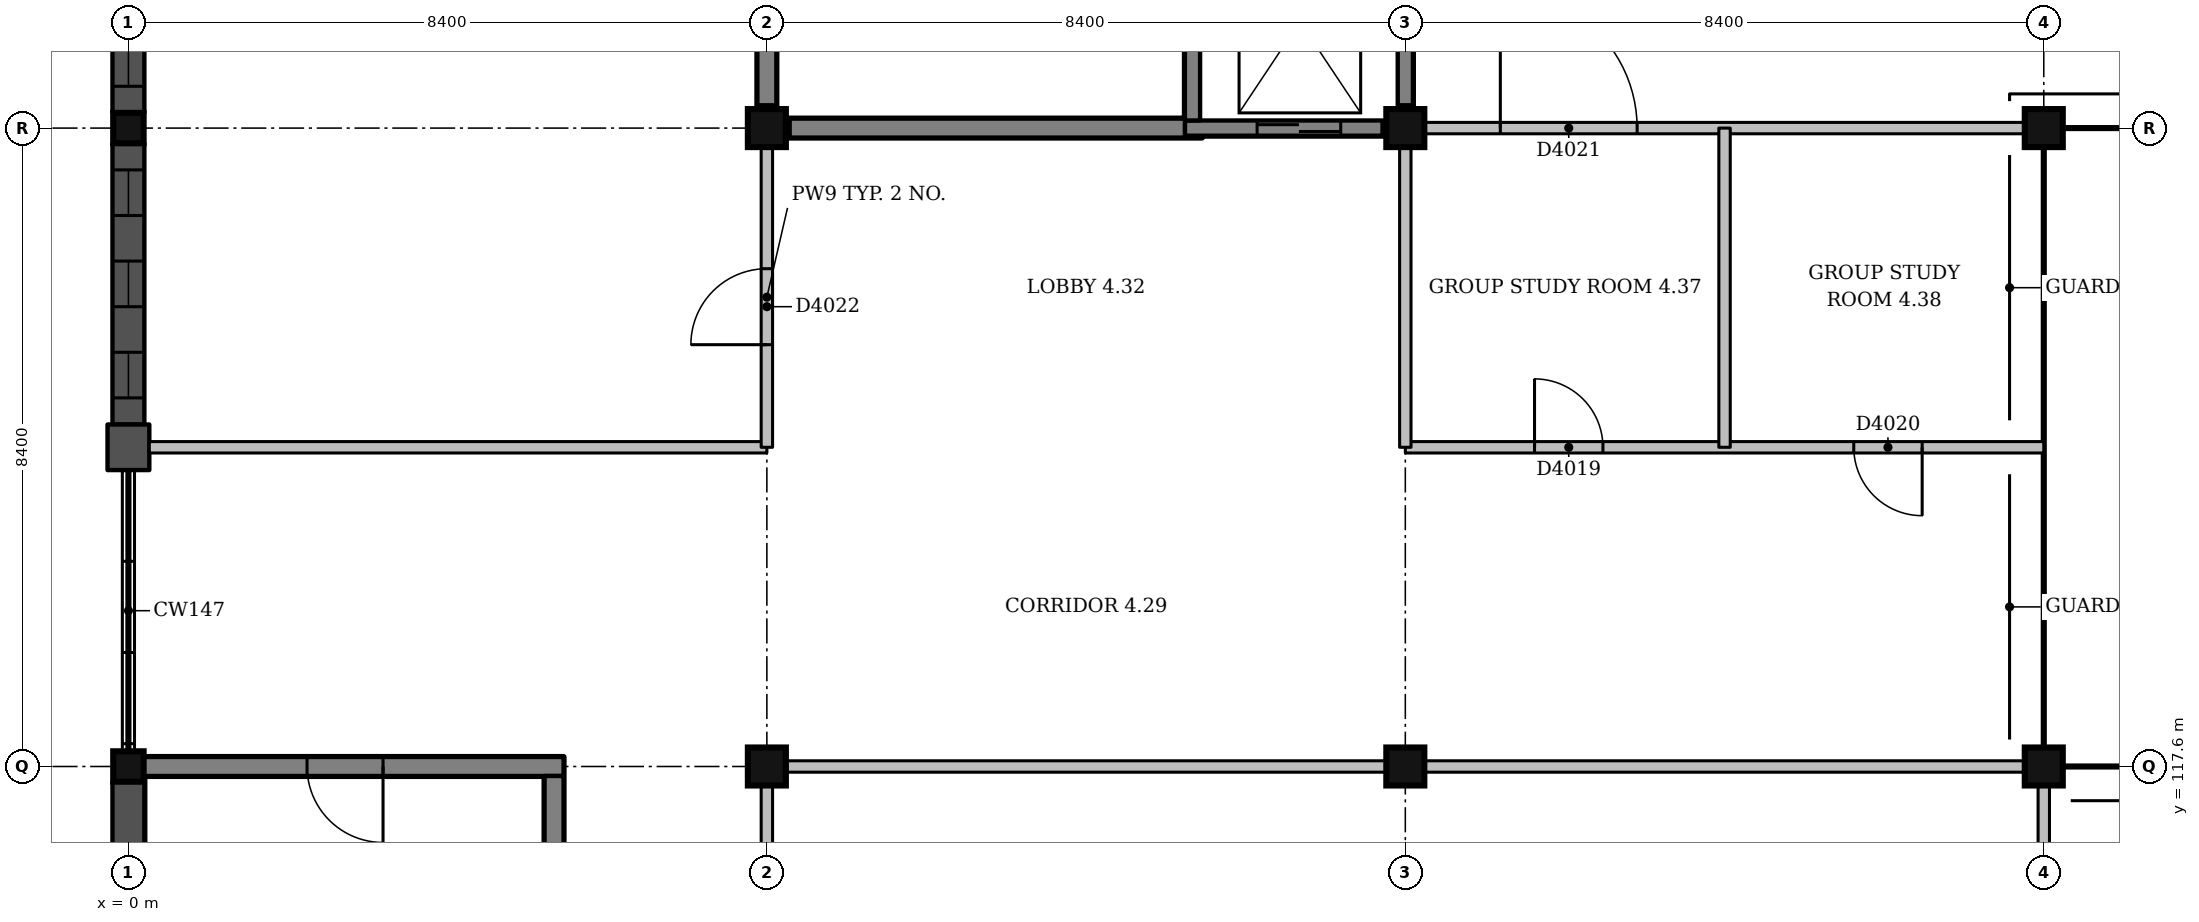
"""IFC4 building model, lengths in metres.
Left out: names, types, materials, properties, quantities, classifications, styles, units other than length and angle.
Written with IfcOpenShell. Run it as: python <this file> out.ifc"""

import sys

from ifc_helpers import new_model, si_unit, direction, frame, frame_2d, origin, origin_2d, place, context, subcontext, project, spatial, rectangle, extrude, element, fill, save


model = new_model("IFC4")
c1 = context("Model", 3, precision=1e-05, world=origin(), true_north=direction((0.0, 1.0)))
c2 = subcontext(c1, "Body", "Model", "MODEL_VIEW")
j1 = project(units=[si_unit("LENGTHUNIT", "METRE"), si_unit("PLANEANGLEUNIT", "RADIAN")], contexts=[c1])
p1 = place(None, origin())
s1 = spatial("IfcSite", under=j1, at=p1, CompositionType="ELEMENT")
p2 = place(p1, origin())
s2 = spatial("IfcBuilding", under=s1, at=p2, CompositionType="ELEMENT")
p3 = place(p2, frame((0.0, 0.0, 18.0)))
s3 = spatial("IfcBuildingStorey", under=s2, at=p3, CompositionType="ELEMENT", Elevation=18.0)
for number, where, z_axis, x_axis in (
    (1, (0.0, 117.6, 0.0), (0.0, 0.0, 1.0), (1.0, 0.0, 0.0)),
    (2, (0.0, 126.0, 0.0), (0.0, 0.0, 1.0), (1.0, 0.0, 0.0)),
):
    element("IfcColumn", number, at=place(p3, frame(where, z_axis=z_axis, x_axis=x_axis)), inside=s3, PredefinedType="COLUMN", context=c2, shape_type="SweptSolid", body=[
        extrude(rectangle(XDim=0.4, YDim=0.4, at=origin_2d()), origin(), (0.0, 0.0, 1.0), 4.5),
    ])
for number, where, z_axis, x_axis in (
    (3, (8.4, 117.6, 0.0), (0.0, 0.0, 1.0), (1.0, 0.0, 0.0)),
    (4, (8.4, 126.0, 0.0), (0.0, 0.0, 1.0), (1.0, 0.0, 0.0)),
    (5, (16.8, 117.6, 0.0), (0.0, 0.0, 1.0), (1.0, 0.0, 0.0)),
    (6, (16.8, 126.0, 0.0), (0.0, 0.0, 1.0), (1.0, 0.0, 0.0)),
    (7, (25.2, 117.6, 0.0), (0.0, 0.0, 1.0), (1.0, 0.0, 0.0)),
    (8, (25.2, 126.0, 0.0), (0.0, 0.0, 1.0), (1.0, 0.0, 0.0)),
):
    element("IfcColumn", number, at=place(p3, frame(where, z_axis=z_axis, x_axis=x_axis)), inside=s3, PredefinedType="COLUMN", context=c2, shape_type="SweptSolid", body=[
        extrude(rectangle(XDim=0.5, YDim=0.5, at=origin_2d()), origin(), (0.0, 0.0, 1.0), 4.5),
    ])
p4 = place(p3, frame((13.9, 126.0, 0.0), z_axis=(0.0, 0.0, 1.0), x_axis=(1.0, 0.0, 0.0)))
e9 = element("IfcWall", 9, at=p4, inside=s3, PredefinedType="SHEAR", context=c2, shape_type="SweptSolid", body=[
    extrude(rectangle(XDim=2.6, YDim=0.2, at=frame_2d((1.3, 0.0))), origin(), (0.0, 0.0, 1.0), 4.5),
])
p5 = place(p4, frame((0.95, 0.0, 0.0)))
e10 = element("IfcOpeningElement", 10, at=p5, cuts=e9, PredefinedType="OPENING", context=c2, shape_type="SweptSolid", body=[
    extrude(rectangle(XDim=1.1, YDim=2.1, at=frame_2d((0.55, 1.05))), frame((0.0, 0.11, 0.0), z_axis=(0.0, -1.0, 0.0), x_axis=(1.0, 0.0, 0.0)), (0.0, 0.0, 1.0), 0.22),
])
p6 = place(p3, frame((14.0, 126.1, 0.0), z_axis=(0.0, 0.0, 1.0), x_axis=(0.0, 1.0, 0.0)))
e11 = element("IfcWall", 11, at=p6, inside=s3, PredefinedType="SHEAR", context=c2, shape_type="SweptSolid", body=[
    extrude(rectangle(XDim=4.0, YDim=0.2, at=frame_2d((2.0, 0.0))), origin(), (0.0, 0.0, 1.0), 4.5),
])
p7 = place(p3, frame((16.8, 126.3, 0.0), z_axis=(0.0, 0.0, 1.0), x_axis=(0.0, 1.0, 0.0)))
e12 = element("IfcWall", 12, at=p7, inside=s3, PredefinedType="SHEAR", context=c2, shape_type="SweptSolid", body=[
    extrude(rectangle(XDim=3.8, YDim=0.2, at=frame_2d((1.9, 0.0))), origin(), (0.0, 0.0, 1.0), 4.5),
])
p8 = place(p3, frame((0.2, 117.6, 0.0), z_axis=(0.0, 0.0, 1.0), x_axis=(1.0, 0.0, 0.0)))
e13 = element("IfcWall", 13, at=p8, inside=s3, PredefinedType="SHEAR", context=c2, shape_type="SweptSolid", body=[
    extrude(rectangle(XDim=5.525, YDim=0.25, at=frame_2d((2.763, 0.0))), origin(), (0.0, 0.0, 1.0), 4.5),
])
p9 = place(p8, frame((2.15, 0.0, 0.0)))
e14 = element("IfcOpeningElement", 14, at=p9, cuts=e13, PredefinedType="OPENING", context=c2, shape_type="SweptSolid", body=[
    extrude(rectangle(XDim=1.0, YDim=2.1, at=frame_2d((0.5, 1.05))), frame((0.0, 0.135, 0.0), z_axis=(0.0, -1.0, 0.0), x_axis=(1.0, 0.0, 0.0)), (0.0, 0.0, 1.0), 0.27),
])
p10 = place(p3, frame((5.6, 113.41, 0.0), z_axis=(0.0, 0.0, 1.0), x_axis=(0.0, 1.0, 0.0)))
e15 = element("IfcWall", 15, at=p10, inside=s3, PredefinedType="SHEAR", context=c2, shape_type="SweptSolid", body=[
    extrude(rectangle(XDim=4.065, YDim=0.25, at=frame_2d((2.033, 0.0))), origin(), (0.0, 0.0, 1.0), 4.5),
])
p11 = place(p3, frame((8.7, 126.0, 0.0), z_axis=(0.0, 0.0, 1.0), x_axis=(1.0, 0.0, 0.0)))
e16 = element("IfcWall", 16, at=p11, inside=s3, PredefinedType="SHEAR", context=c2, shape_type="SweptSolid", body=[
    extrude(rectangle(XDim=5.2, YDim=0.25, at=frame_2d((2.6, 0.0))), origin(), (0.0, 0.0, 1.0), 4.5),
])
p12 = place(p3, frame((8.4, 126.3, 0.0), z_axis=(0.0, 0.0, 1.0), x_axis=(0.0, 1.0, 0.0)))
e17 = element("IfcWall", 17, at=p12, inside=s3, PredefinedType="SHEAR", context=c2, shape_type="SweptSolid", body=[
    extrude(rectangle(XDim=7.9, YDim=0.25, at=frame_2d((3.95, 0.0))), origin(), (0.0, 0.0, 1.0), 4.5),
])
p13 = place(p12, frame((6.35, 0.0, 0.0)))
e18 = element("IfcOpeningElement", 18, at=p13, cuts=e17, PredefinedType="OPENING", context=c2, shape_type="SweptSolid", body=[
    extrude(rectangle(XDim=1.0, YDim=2.1, at=frame_2d((0.5, 1.05))), frame((0.0, 0.135, 0.0), z_axis=(0.0, -1.0, 0.0), x_axis=(1.0, 0.0, 0.0)), (0.0, 0.0, 1.0), 0.27),
])
p14 = place(p3, frame((0.0, 129.9, 0.0), z_axis=(0.0, 0.0, 1.0), x_axis=(0.0, -1.0, 0.0)))
e19 = element("IfcWall", 19, at=p14, inside=s3, PredefinedType="SOLIDWALL", context=c2, shape_type="SweptSolid", body=[
    extrude(rectangle(XDim=3.7, YDim=0.42, at=frame_2d((1.85, 0.0))), origin(), (0.0, 0.0, 1.0), 3.35),
])
p15 = place(p14, frame((0.35, 0.0, 1.0)))
e20 = element("IfcOpeningElement", 20, at=p15, cuts=e19, PredefinedType="OPENING", context=c2, shape_type="SweptSolid", body=[
    extrude(rectangle(XDim=0.6, YDim=1.8, at=frame_2d((0.3, 0.9))), frame((0.0, 0.22, 0.0), z_axis=(0.0, -1.0, 0.0), x_axis=(1.0, 0.0, 0.0)), (0.0, 0.0, 1.0), 0.44),
])
p16 = place(p14, frame((1.55, 0.0, 1.0)))
e21 = element("IfcOpeningElement", 21, at=p16, cuts=e19, PredefinedType="OPENING", context=c2, shape_type="SweptSolid", body=[
    extrude(rectangle(XDim=0.6, YDim=1.8, at=frame_2d((0.3, 0.9))), frame((0.0, 0.22, 0.0), z_axis=(0.0, -1.0, 0.0), x_axis=(1.0, 0.0, 0.0)), (0.0, 0.0, 1.0), 0.44),
])
p17 = place(p14, frame((2.75, 0.0, 1.0)))
e22 = element("IfcOpeningElement", 22, at=p17, cuts=e19, PredefinedType="OPENING", context=c2, shape_type="SweptSolid", body=[
    extrude(rectangle(XDim=0.6, YDim=1.8, at=frame_2d((0.3, 0.9))), frame((0.0, 0.22, 0.0), z_axis=(0.0, -1.0, 0.0), x_axis=(1.0, 0.0, 0.0)), (0.0, 0.0, 1.0), 0.44),
])
p18 = place(p3, frame((0.0, 125.8, 0.0), z_axis=(0.0, 0.0, 1.0), x_axis=(0.0, -1.0, 0.0)))
e23 = element("IfcWall", 23, at=p18, inside=s3, PredefinedType="SOLIDWALL", context=c2, shape_type="SweptSolid", body=[
    extrude(rectangle(XDim=3.7, YDim=0.42, at=frame_2d((1.85, 0.0))), origin(), (0.0, 0.0, 1.0), 3.35),
])
p19 = place(p18, frame((0.35, 0.0, 1.0)))
e24 = element("IfcOpeningElement", 24, at=p19, cuts=e23, PredefinedType="OPENING", context=c2, shape_type="SweptSolid", body=[
    extrude(rectangle(XDim=0.6, YDim=1.8, at=frame_2d((0.3, 0.9))), frame((0.0, 0.22, 0.0), z_axis=(0.0, -1.0, 0.0), x_axis=(1.0, 0.0, 0.0)), (0.0, 0.0, 1.0), 0.44),
])
p20 = place(p18, frame((1.55, 0.0, 1.0)))
e25 = element("IfcOpeningElement", 25, at=p20, cuts=e23, PredefinedType="OPENING", context=c2, shape_type="SweptSolid", body=[
    extrude(rectangle(XDim=0.6, YDim=1.8, at=frame_2d((0.3, 0.9))), frame((0.0, 0.22, 0.0), z_axis=(0.0, -1.0, 0.0), x_axis=(1.0, 0.0, 0.0)), (0.0, 0.0, 1.0), 0.44),
])
p21 = place(p18, frame((2.75, 0.0, 1.0)))
e26 = element("IfcOpeningElement", 26, at=p21, cuts=e23, PredefinedType="OPENING", context=c2, shape_type="SweptSolid", body=[
    extrude(rectangle(XDim=0.6, YDim=1.8, at=frame_2d((0.3, 0.9))), frame((0.0, 0.22, 0.0), z_axis=(0.0, -1.0, 0.0), x_axis=(1.0, 0.0, 0.0)), (0.0, 0.0, 1.0), 0.44),
])
p22 = place(p3, frame((0.0, 122.1, 0.0), z_axis=(0.0, 0.0, 1.0), x_axis=(0.0, -1.0, 0.0)))
e27 = element("IfcWall", 27, at=p22, inside=s3, PredefinedType="SOLIDWALL", context=c2, shape_type="SweptSolid", body=[
    extrude(rectangle(XDim=0.6, YDim=0.55, at=frame_2d((0.3, 0.0))), origin(), (0.0, 0.0, 1.0), 3.35),
])
p23 = place(p3, frame((0.0, 117.4, 0.0), z_axis=(0.0, 0.0, 1.0), x_axis=(0.0, -1.0, 0.0)))
e28 = element("IfcWall", 28, at=p23, inside=s3, PredefinedType="SOLIDWALL", context=c2, shape_type="SweptSolid", body=[
    extrude(rectangle(XDim=3.7, YDim=0.42, at=frame_2d((1.85, 0.0))), origin(), (0.0, 0.0, 1.0), 4.5),
])
p24 = place(p3, frame((8.65, 117.6, 0.0), z_axis=(0.0, 0.0, 1.0), x_axis=(1.0, 0.0, 0.0)))
e29 = element("IfcWall", 29, at=p24, inside=s3, PredefinedType="PARTITIONING", context=c2, shape_type="SweptSolid", body=[
    extrude(rectangle(XDim=7.9, YDim=0.15, at=frame_2d((3.95, 0.0))), origin(), (0.0, 0.0, 1.0), 3.4),
])
p25 = place(p3, frame((17.05, 117.6, 0.0), z_axis=(0.0, 0.0, 1.0), x_axis=(1.0, 0.0, 0.0)))
e30 = element("IfcWall", 30, at=p25, inside=s3, PredefinedType="PARTITIONING", context=c2, shape_type="SweptSolid", body=[
    extrude(rectangle(XDim=7.9, YDim=0.15, at=frame_2d((3.95, 0.0))), origin(), (0.0, 0.0, 1.0), 3.4),
])
p26 = place(p3, frame((0.275, 121.8, 0.0), z_axis=(0.0, 0.0, 1.0), x_axis=(1.0, 0.0, 0.0)))
e31 = element("IfcWall", 31, at=p26, inside=s3, PredefinedType="PARTITIONING", context=c2, shape_type="SweptSolid", body=[
    extrude(rectangle(XDim=8.125, YDim=0.15, at=frame_2d((4.062, 0.0))), origin(), (0.0, 0.0, 1.0), 3.4),
])
p27 = place(p3, frame((16.8, 121.8, 0.0), z_axis=(0.0, 0.0, 1.0), x_axis=(1.0, 0.0, 0.0)))
e32 = element("IfcWall", 32, at=p27, inside=s3, PredefinedType="PARTITIONING", context=c2, shape_type="SweptSolid", body=[
    extrude(rectangle(XDim=8.4, YDim=0.15, at=frame_2d((4.2, 0.0))), origin(), (0.0, 0.0, 1.0), 3.4),
])
p28 = place(p27, frame((1.7, 0.0, 0.0)))
e33 = element("IfcOpeningElement", 33, at=p28, cuts=e32, PredefinedType="OPENING", context=c2, shape_type="SweptSolid", body=[
    extrude(rectangle(XDim=0.9, YDim=2.1, at=frame_2d((0.45, 1.05))), frame((0.0, 0.085, 0.0), z_axis=(0.0, -1.0, 0.0), x_axis=(1.0, 0.0, 0.0)), (0.0, 0.0, 1.0), 0.17),
])
p29 = place(p27, frame((5.9, 0.0, 0.0)))
e34 = element("IfcOpeningElement", 34, at=p29, cuts=e32, PredefinedType="OPENING", context=c2, shape_type="SweptSolid", body=[
    extrude(rectangle(XDim=0.9, YDim=2.1, at=frame_2d((0.45, 1.05))), frame((0.0, 0.085, 0.0), z_axis=(0.0, -1.0, 0.0), x_axis=(1.0, 0.0, 0.0)), (0.0, 0.0, 1.0), 0.17),
])
p30 = place(p3, frame((17.05, 126.0, 0.0), z_axis=(0.0, 0.0, 1.0), x_axis=(1.0, 0.0, 0.0)))
e35 = element("IfcWall", 35, at=p30, inside=s3, PredefinedType="PARTITIONING", context=c2, shape_type="SweptSolid", body=[
    extrude(rectangle(XDim=7.9, YDim=0.15, at=frame_2d((3.95, 0.0))), origin(), (0.0, 0.0, 1.0), 3.4),
])
p31 = place(p30, frame((1.0, 0.0, 0.0)))
e36 = element("IfcOpeningElement", 36, at=p31, cuts=e35, PredefinedType="OPENING", context=c2, shape_type="SweptSolid", body=[
    extrude(rectangle(XDim=1.8, YDim=2.1, at=frame_2d((0.9, 1.05))), frame((0.0, 0.085, 0.0), z_axis=(0.0, -1.0, 0.0), x_axis=(1.0, 0.0, 0.0)), (0.0, 0.0, 1.0), 0.17),
])
p32 = place(p3, frame((8.4, 113.55, 0.0), z_axis=(0.0, 0.0, 1.0), x_axis=(0.0, 1.0, 0.0)))
e37 = element("IfcWall", 37, at=p32, inside=s3, PredefinedType="PARTITIONING", context=c2, shape_type="SweptSolid", body=[
    extrude(rectangle(XDim=3.8, YDim=0.15, at=frame_2d((1.9, 0.0))), origin(), (0.0, 0.0, 1.0), 3.4),
])
p33 = place(p32, frame((1.35, 0.0, 0.0)))
e38 = element("IfcOpeningElement", 38, at=p33, cuts=e37, PredefinedType="OPENING", context=c2, shape_type="SweptSolid", body=[
    extrude(rectangle(XDim=1.0, YDim=2.1, at=frame_2d((0.5, 1.05))), frame((0.0, 0.085, 0.0), z_axis=(0.0, -1.0, 0.0), x_axis=(1.0, 0.0, 0.0)), (0.0, 0.0, 1.0), 0.17),
])
p34 = place(p3, frame((8.4, 121.8, 0.0), z_axis=(0.0, 0.0, 1.0), x_axis=(0.0, 1.0, 0.0)))
e39 = element("IfcWall", 39, at=p34, inside=s3, PredefinedType="PARTITIONING", context=c2, shape_type="SweptSolid", body=[
    extrude(rectangle(XDim=3.95, YDim=0.15, at=frame_2d((1.975, 0.0))), origin(), (0.0, 0.0, 1.0), 3.4),
])
p35 = place(p34, frame((1.35, 0.0, 0.0)))
e40 = element("IfcOpeningElement", 40, at=p35, cuts=e39, PredefinedType="OPENING", context=c2, shape_type="SweptSolid", body=[
    extrude(rectangle(XDim=1.0, YDim=2.1, at=frame_2d((0.5, 1.05))), frame((0.0, 0.085, 0.0), z_axis=(0.0, -1.0, 0.0), x_axis=(1.0, 0.0, 0.0)), (0.0, 0.0, 1.0), 0.17),
])
p36 = place(p3, frame((16.8, 121.8, 0.0), z_axis=(0.0, 0.0, 1.0), x_axis=(0.0, 1.0, 0.0)))
e41 = element("IfcWall", 41, at=p36, inside=s3, PredefinedType="PARTITIONING", context=c2, shape_type="SweptSolid", body=[
    extrude(rectangle(XDim=3.95, YDim=0.15, at=frame_2d((1.975, 0.0))), origin(), (0.0, 0.0, 1.0), 3.4),
])
p37 = place(p3, frame((21.0, 121.8, 0.0), z_axis=(0.0, 0.0, 1.0), x_axis=(0.0, 1.0, 0.0)))
e42 = element("IfcWall", 42, at=p37, inside=s3, PredefinedType="PARTITIONING", context=c2, shape_type="SweptSolid", body=[
    extrude(rectangle(XDim=4.2, YDim=0.15, at=frame_2d((2.1, 0.0))), origin(), (0.0, 0.0, 1.0), 3.4),
])
p38 = place(p3, frame((25.2, 109.425, 0.0), z_axis=(0.0, 0.0, 1.0), x_axis=(0.0, 1.0, 0.0)))
e43 = element("IfcWall", 43, at=p38, inside=s3, PredefinedType="PARTITIONING", context=c2, shape_type="SweptSolid", body=[
    extrude(rectangle(XDim=7.925, YDim=0.15, at=frame_2d((3.962, 0.0))), origin(), (0.0, 0.0, 1.0), 4.15),
])
p39 = place(p17, origin())
e44 = element("IfcWindow", 44, at=p39, inside=s3, PartitioningType="SINGLE_PANEL", PredefinedType="WINDOW", context=c2, shape_type="SweptSolid", body=[
    extrude(rectangle(XDim=0.6, YDim=1.8, at=frame_2d((0.3, 0.9))), frame((0.0, 0.15, 0.0), z_axis=(0.0, -1.0, 0.0), x_axis=(1.0, 0.0, 0.0)), (0.0, 0.0, 1.0), 0.06),
])
fill(e22, e44)
p40 = place(p19, origin())
e45 = element("IfcWindow", 45, at=p40, inside=s3, PartitioningType="SINGLE_PANEL", PredefinedType="WINDOW", context=c2, shape_type="SweptSolid", body=[
    extrude(rectangle(XDim=0.6, YDim=1.8, at=frame_2d((0.3, 0.9))), frame((0.0, 0.15, 0.0), z_axis=(0.0, -1.0, 0.0), x_axis=(1.0, 0.0, 0.0)), (0.0, 0.0, 1.0), 0.06),
])
fill(e24, e45)
p41 = place(p20, origin())
e46 = element("IfcWindow", 46, at=p41, inside=s3, PartitioningType="SINGLE_PANEL", PredefinedType="WINDOW", context=c2, shape_type="SweptSolid", body=[
    extrude(rectangle(XDim=0.6, YDim=1.8, at=frame_2d((0.3, 0.9))), frame((0.0, 0.15, 0.0), z_axis=(0.0, -1.0, 0.0), x_axis=(1.0, 0.0, 0.0)), (0.0, 0.0, 1.0), 0.06),
])
fill(e25, e46)
p42 = place(p21, origin())
e47 = element("IfcWindow", 47, at=p42, inside=s3, PartitioningType="SINGLE_PANEL", PredefinedType="WINDOW", context=c2, shape_type="SweptSolid", body=[
    extrude(rectangle(XDim=0.6, YDim=1.8, at=frame_2d((0.3, 0.9))), frame((0.0, 0.15, 0.0), z_axis=(0.0, -1.0, 0.0), x_axis=(1.0, 0.0, 0.0)), (0.0, 0.0, 1.0), 0.06),
])
fill(e26, e47)
p43 = place(p28, origin())
e48 = element("IfcDoor", 48, at=p43, inside=s3, OperationType="SINGLE_SWING_LEFT", PredefinedType="DOOR", context=c2, shape_type="SweptSolid", body=[
    extrude(rectangle(XDim=0.9, YDim=2.1, at=frame_2d((0.45, 1.05))), frame((0.0, 0.025, 0.0), z_axis=(0.0, -1.0, 0.0), x_axis=(1.0, 0.0, 0.0)), (0.0, 0.0, 1.0), 0.05),
])
fill(e33, e48)
p44 = place(p29, origin())
e49 = element("IfcDoor", 49, at=p44, inside=s3, OperationType="SINGLE_SWING_RIGHT", PredefinedType="DOOR", context=c2, shape_type="SweptSolid", body=[
    extrude(rectangle(XDim=0.9, YDim=2.1, at=frame_2d((0.45, 1.05))), frame((0.0, 0.025, 0.0), z_axis=(0.0, -1.0, 0.0), x_axis=(1.0, 0.0, 0.0)), (0.0, 0.0, 1.0), 0.05),
])
fill(e34, e49)
p45 = place(p31, origin())
e50 = element("IfcDoor", 50, at=p45, inside=s3, OperationType="DOUBLE_DOOR_SINGLE_SWING", PredefinedType="DOOR", context=c2, shape_type="SweptSolid", body=[
    extrude(rectangle(XDim=1.8, YDim=2.1, at=frame_2d((0.9, 1.05))), frame((0.0, 0.025, 0.0), z_axis=(0.0, -1.0, 0.0), x_axis=(1.0, 0.0, 0.0)), (0.0, 0.0, 1.0), 0.05),
])
fill(e36, e50)
p46 = place(p35, origin())
e51 = element("IfcDoor", 51, at=p46, inside=s3, OperationType="SINGLE_SWING_LEFT", PredefinedType="DOOR", context=c2, shape_type="SweptSolid", body=[
    extrude(rectangle(XDim=1.0, YDim=2.1, at=frame_2d((0.5, 1.05))), frame((0.0, 0.025, 0.0), z_axis=(0.0, -1.0, 0.0), x_axis=(1.0, 0.0, 0.0)), (0.0, 0.0, 1.0), 0.05),
])
fill(e40, e51)
p47 = place(p9, origin())
e52 = element("IfcDoor", 52, at=p47, inside=s3, OperationType="SINGLE_SWING_RIGHT", PredefinedType="DOOR", context=c2, shape_type="SweptSolid", body=[
    extrude(rectangle(XDim=1.0, YDim=2.1, at=frame_2d((0.5, 1.05))), frame((0.0, 0.025, 0.0), z_axis=(0.0, -1.0, 0.0), x_axis=(1.0, 0.0, 0.0)), (0.0, 0.0, 1.0), 0.05),
])
fill(e14, e52)
p48 = place(p5, origin())
e53 = element("IfcDoor", 53, at=p48, inside=s3, OperationType="SLIDING_TO_LEFT", PredefinedType="DOOR", context=c2, shape_type="SweptSolid", body=[
    extrude(rectangle(XDim=1.1, YDim=2.1, at=frame_2d((0.55, 1.05))), frame((0.0, 0.025, 0.0), z_axis=(0.0, -1.0, 0.0), x_axis=(1.0, 0.0, 0.0)), (0.0, 0.0, 1.0), 0.05),
])
fill(e10, e53)
save(model, sys.argv[1])
